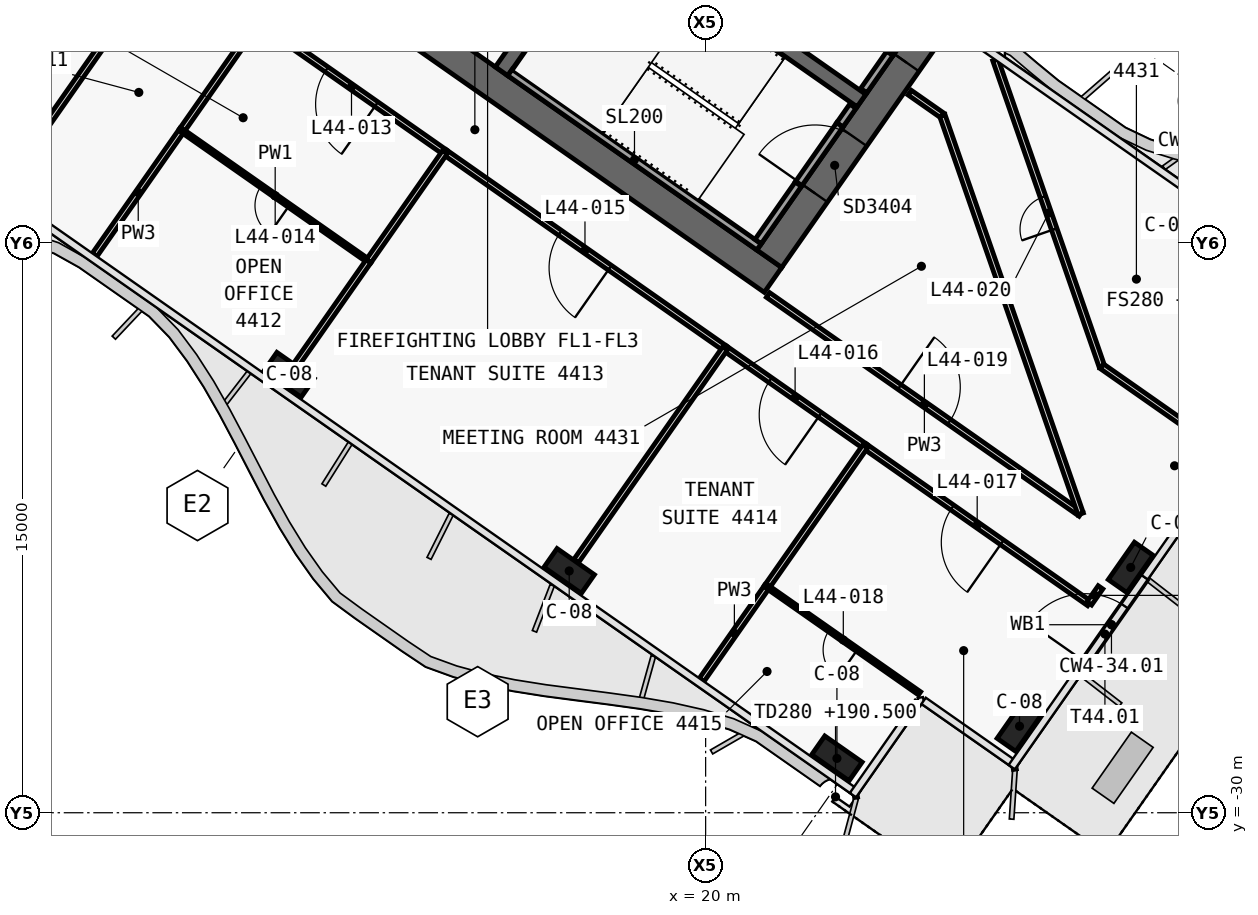
"""IFC4 building model, lengths in metres.
Left out: names, types, materials, properties, quantities, classifications, styles, units other than length and angle.
Written with IfcOpenShell. Run it as: python <this file> out.ifc"""

import sys

from ifc_helpers import new_model, si_unit, direction, frame, frame_2d, origin, origin_2d, place, context, subcontext, project, spatial, polyline, rectangle, outline, extrude, element, fill, save


model = new_model("IFC4")
c1 = context("Model", 3, precision=1e-05, world=origin(), true_north=direction((0.0, 1.0)))
c2 = subcontext(c1, "Body", "Model", "MODEL_VIEW")
j1 = project(units=[si_unit("LENGTHUNIT", "METRE"), si_unit("PLANEANGLEUNIT", "RADIAN")], contexts=[c1])
p1 = place(None, origin())
s1 = spatial("IfcSite", under=j1, at=p1, CompositionType="ELEMENT")
p2 = place(p1, origin())
s2 = spatial("IfcBuilding", under=s1, at=p2, CompositionType="ELEMENT")
p3 = place(p2, frame((0.0, 0.0, 190.5)))
s3 = spatial("IfcBuildingStorey", under=s2, at=p3, CompositionType="ELEMENT", Elevation=190.5)
p4 = place(p3, frame((-0.029, -0.712, 0.0), z_axis=(0.0, 0.0, 1.0), x_axis=(0.819151758019, -0.573576845187, 0.0)))
e1 = element("IfcWall", 1, at=p4, inside=s3, PredefinedType="SHEAR", context=c2, shape_type="SweptSolid", body=[
    extrude(outline(polyline([(26.616, 0.4), (-0.0, 0.4), (0.56, -0.4), (26.616, -0.4), (26.616, 0.4)])), origin(), (0.0, 0.0, 1.0), 3.9),
])
p5 = place(p4, frame((0.966, 0.0, 0.0)))
e2 = element("IfcOpeningElement", 2, at=p5, cuts=e1, PredefinedType="OPENING", context=c2, shape_type="SweptSolid", body=[
    extrude(rectangle(XDim=1.5, YDim=2.1, at=frame_2d((0.75, 1.05))), frame((0.0, 0.41, 0.0), z_axis=(0.0, -1.0, 0.0), x_axis=(1.0, 0.0, 0.0)), (0.0, 0.0, 1.0), 0.82),
])
p6 = place(p4, frame((12.366, 0.0, 0.0)))
e3 = element("IfcOpeningElement", 3, at=p6, cuts=e1, PredefinedType="OPENING", context=c2, shape_type="SweptSolid", body=[
    extrude(rectangle(XDim=1.5, YDim=2.1, at=frame_2d((0.75, 1.05))), frame((0.0, 0.41, 0.0), z_axis=(0.0, -1.0, 0.0), x_axis=(1.0, 0.0, 0.0)), (0.0, 0.0, 1.0), 0.82),
])
p7 = place(p3, frame((21.675, -15.421, 0.0), z_axis=(0.0, 0.0, 1.0), x_axis=(0.573581815061, 0.819148278049, 0.0)))
e4 = element("IfcWall", 4, at=p7, inside=s3, PredefinedType="SHEAR", context=c2, shape_type="SweptSolid", body=[
    extrude(outline(polyline([(9.6, 0.4), (0.0, 0.4), (0.0, -0.4), (9.6, -0.4), (9.6, 0.4)])), origin(), (0.0, 0.0, 1.0), 3.9),
])
p8 = place(p7, frame((6.3, 0.0, 0.0)))
e5 = element("IfcOpeningElement", 5, at=p8, cuts=e4, PredefinedType="OPENING", context=c2, shape_type="SweptSolid", body=[
    extrude(rectangle(XDim=1.8, YDim=2.1, at=frame_2d((0.9, 1.05))), frame((0.0, 0.41, 0.0), z_axis=(0.0, -1.0, 0.0), x_axis=(1.0, 0.0, 0.0)), (0.0, 0.0, 1.0), 0.82),
])
p9 = place(p7, frame((2.1, 0.0, 0.0)))
e6 = element("IfcOpeningElement", 6, at=p9, cuts=e4, PredefinedType="OPENING", context=c2, shape_type="SweptSolid", body=[
    extrude(rectangle(XDim=1.8, YDim=2.1, at=frame_2d((0.9, 1.05))), frame((0.0, 0.41, 0.0), z_axis=(0.0, -1.0, 0.0), x_axis=(1.0, 0.0, 0.0)), (0.0, 0.0, 1.0), 0.82),
])
p10 = place(p3, frame((14.63, -10.488, 0.0), z_axis=(0.0, 0.0, 1.0), x_axis=(0.573611936273, 0.819127185829, 0.0)))
e7 = element("IfcWall", 7, at=p10, inside=s3, PredefinedType="SHEAR", context=c2, shape_type="SweptSolid", body=[
    extrude(outline(polyline([(0.0, 0.2), (0.0, -0.2), (4.6, -0.2), (4.6, 0.2), (0.0, 0.2)])), origin(), (0.0, 0.0, 1.0), 3.9),
])
p11 = place(p3, frame((2.638, 3.768, 0.0), z_axis=(0.0, 0.0, 1.0), x_axis=(0.81915267502, -0.573575535572, 0.0)))
e8 = element("IfcWall", 8, at=p11, inside=s3, PredefinedType="SHEAR", context=c2, shape_type="SweptSolid", body=[
    extrude(outline(polyline([(0.0, 0.2), (0.0, -0.2), (26.2, -0.2), (26.2, 0.2), (0.0, 0.2)])), origin(), (0.0, 0.0, 1.0), 3.9),
])
p12 = place(p11, frame((9.637, 0.0, 0.0)))
e9 = element("IfcOpeningElement", 9, at=p12, cuts=e8, PredefinedType="OPENING", context=c2, shape_type="SweptSolid", body=[
    extrude(rectangle(XDim=1.2, YDim=2.1, at=frame_2d((0.6, 1.05))), frame((0.0, 0.21, 0.0), z_axis=(0.0, -1.0, 0.0), x_axis=(1.0, 0.0, 0.0)), (0.0, 0.0, 1.0), 0.42),
])
p13 = place(p11, frame((11.812, 0.0, 0.0)))
e10 = element("IfcOpeningElement", 10, at=p13, cuts=e8, PredefinedType="OPENING", context=c2, shape_type="SweptSolid", body=[
    extrude(rectangle(XDim=1.2, YDim=2.1, at=frame_2d((0.6, 1.05))), frame((0.0, 0.21, 0.0), z_axis=(0.0, -1.0, 0.0), x_axis=(1.0, 0.0, 0.0)), (0.0, 0.0, 1.0), 0.42),
])
p14 = place(p11, frame((13.988, 0.0, 0.0)))
e11 = element("IfcOpeningElement", 11, at=p14, cuts=e8, PredefinedType="OPENING", context=c2, shape_type="SweptSolid", body=[
    extrude(rectangle(XDim=1.2, YDim=2.1, at=frame_2d((0.6, 1.05))), frame((0.0, 0.21, 0.0), z_axis=(0.0, -1.0, 0.0), x_axis=(1.0, 0.0, 0.0)), (0.0, 0.0, 1.0), 0.42),
])
p15 = place(p11, frame((16.262, 0.0, 0.0)))
e12 = element("IfcOpeningElement", 12, at=p15, cuts=e8, PredefinedType="OPENING", context=c2, shape_type="SweptSolid", body=[
    extrude(rectangle(XDim=1.0, YDim=2.1, at=frame_2d((0.5, 1.05))), frame((0.0, 0.21, 0.0), z_axis=(0.0, -1.0, 0.0), x_axis=(1.0, 0.0, 0.0)), (0.0, 0.0, 1.0), 0.42),
])
for number, where, z_axis, x_axis in (
    (13, (9.038, -18.475, 0.0), (0.0, 0.0, 1.0), (0.819, -0.574, 0.0)),
    (14, (16.41, -23.637, 0.0), (0.0, 0.0, 1.0), (0.819, -0.574, 0.0)),
    (15, (23.455, -28.57, 0.0), (0.0, 0.0, 1.0), (0.819, -0.574, 0.0)),
    (16, (28.26, -27.723, 0.0), (0.0, 0.0, 1.0), (0.574, 0.819, 0.0)),
    (17, (31.185, -23.545, 0.0), (0.0, 0.0, 1.0), (0.574, 0.819, 0.0)),
):
    element("IfcColumn", number, at=place(p3, frame(where, z_axis=z_axis, x_axis=x_axis)), inside=s3, PredefinedType="COLUMN", context=c2, shape_type="SweptSolid", body=[
        extrude(rectangle(XDim=1.2, YDim=0.6, at=origin_2d()), origin(), (0.0, 0.0, 1.0), 3.9),
    ])
p16 = place(p3, frame((24.162, -10.998, 0.0), z_axis=(0.0, 0.0, 1.0), x_axis=(0.573612502218, 0.819126789514, 0.0)))
e18 = element("IfcWall", 18, at=p16, inside=s3, PredefinedType="SOLIDWALL", context=c2, shape_type="SweptSolid", body=[
    extrude(rectangle(XDim=1.2, YDim=0.2, at=frame_2d((0.6, 0.0))), origin(), (0.0, 0.0, 1.0), 3.62),
])
p17 = place(p3, frame((24.85, -10.014, 2.15), z_axis=(0.0, 0.0, 1.0), x_axis=(0.573505465124, 0.819201734296, 0.0)))
e19 = element("IfcWall", 19, at=p17, inside=s3, PredefinedType="SOLIDWALL", context=c2, shape_type="SweptSolid", body=[
    extrude(rectangle(XDim=1.9, YDim=0.2, at=frame_2d((0.95, 0.0))), origin(), (0.0, 0.0, 1.0), 1.47),
])
p18 = place(p3, frame((14.851, -10.521, 0.0), z_axis=(0.0, 0.0, 1.0), x_axis=(0.819141584393, -0.57359137434, 0.0)))
e20 = element("IfcWall", 20, at=p18, inside=s3, PredefinedType="SOLIDWALL", context=c2, shape_type="SweptSolid", body=[
    extrude(rectangle(XDim=8.0, YDim=0.2, at=frame_2d((4.0, 0.0))), origin(), (0.0, 0.0, 1.0), 3.62),
])
p19 = place(p3, frame((21.38, -14.97, 0.0), z_axis=(0.0, 0.0, 1.0), x_axis=(0.573559770908, 0.819163713305, 0.0)))
e21 = element("IfcWall", 21, at=p19, inside=s3, PredefinedType="SOLIDWALL", context=c2, shape_type="SweptSolid", body=[
    extrude(rectangle(XDim=1.85, YDim=0.2, at=frame_2d((0.925, 0.0))), origin(), (0.0, 0.0, 1.0), 3.62),
])
p20 = place(p3, frame((23.531, -11.898, 0.0), z_axis=(0.0, 0.0, 1.0), x_axis=(0.573708088123, 0.819059844958, 0.0)))
e22 = element("IfcWall", 22, at=p20, inside=s3, PredefinedType="SOLIDWALL", context=c2, shape_type="SweptSolid", body=[
    extrude(rectangle(XDim=0.6, YDim=0.2, at=frame_2d((0.3, 0.0))), origin(), (0.0, 0.0, 1.0), 3.62),
])
p21 = place(p3, frame((22.441, -13.455, 2.15), z_axis=(0.0, 0.0, 1.0), x_axis=(0.573591692345, 0.819141361715, 0.0)))
e23 = element("IfcWall", 23, at=p21, inside=s3, PredefinedType="SOLIDWALL", context=c2, shape_type="SweptSolid", body=[
    extrude(rectangle(XDim=1.9, YDim=0.2, at=frame_2d((0.95, 0.0))), origin(), (0.0, 0.0, 1.0), 1.47),
])
p22 = place(p3, frame((29.821, -26.277, 0.0), z_axis=(0.0, 0.0, 1.0), x_axis=(0.57360481557, 0.819132172213, 0.0)))
e24 = element("IfcWall", 24, at=p22, inside=s3, PredefinedType="SOLIDWALL", context=c2, shape_type="SweptSolid", body=[
    extrude(rectangle(XDim=2.99, YDim=0.2, at=frame_2d((1.495, 0.0))), origin(), (0.0, 0.0, 1.0), 3.62),
])
p23 = place(p22, frame((0.295, 0.0, 0.0)))
e25 = element("IfcOpeningElement", 25, at=p23, cuts=e24, PredefinedType="OPENING", context=c2, shape_type="SweptSolid", body=[
    extrude(rectangle(XDim=1.8, YDim=2.4, at=frame_2d((0.9, 1.2))), frame((0.0, 0.11, 0.0), z_axis=(0.0, -1.0, 0.0), x_axis=(1.0, 0.0, 0.0)), (0.0, 0.0, 1.0), 0.22),
])
p24 = place(p3, frame((21.642, -16.375, 0.0), z_axis=(0.0, 0.0, 1.0), x_axis=(0.819157697527, -0.573568362606, 0.0)))
e26 = element("IfcWall", 26, at=p24, inside=s3, PredefinedType="PARTITIONING", context=c2, shape_type="SweptSolid", body=[
    extrude(rectangle(XDim=10.045, YDim=0.15, at=frame_2d((5.023, 0.0))), origin(), (0.0, 0.0, 1.0), 3.0),
])
p25 = place(p24, frame((4.223, 0.0, 0.0)))
e27 = element("IfcOpeningElement", 27, at=p25, cuts=e26, PredefinedType="OPENING", context=c2, shape_type="SweptSolid", body=[
    extrude(rectangle(XDim=1.6, YDim=2.1, at=frame_2d((0.8, 1.05))), frame((0.0, 0.085, 0.0), z_axis=(0.0, -1.0, 0.0), x_axis=(1.0, 0.0, 0.0)), (0.0, 0.0, 1.0), 0.17),
])
p26 = place(p3, frame((13.14, -12.619, 0.0), z_axis=(0.0, 0.0, 1.0), x_axis=(-0.819145946981, 0.573585144111, 0.0)))
e28 = element("IfcWall", 28, at=p26, inside=s3, PredefinedType="PARTITIONING", context=c2, shape_type="SweptSolid", body=[
    extrude(rectangle(XDim=6.004, YDim=0.15, at=frame_2d((3.002, 0.0))), origin(), (0.0, 0.0, 1.0), 3.0),
])
p27 = place(p26, frame((2.202, 0.0, 0.0)))
e29 = element("IfcOpeningElement", 29, at=p27, cuts=e28, PredefinedType="OPENING", context=c2, shape_type="SweptSolid", body=[
    extrude(rectangle(XDim=1.6, YDim=2.1, at=frame_2d((0.8, 1.05))), frame((0.0, 0.085, 0.0), z_axis=(0.0, -1.0, 0.0), x_axis=(1.0, 0.0, 0.0)), (0.0, 0.0, 1.0), 0.17),
])
p28 = place(p3, frame((20.513, -17.781, 0.0), z_axis=(0.0, 0.0, 1.0), x_axis=(-0.819155480642, 0.5735715287, 0.0)))
e30 = element("IfcWall", 30, at=p28, inside=s3, PredefinedType="PARTITIONING", context=c2, shape_type="SweptSolid", body=[
    extrude(rectangle(XDim=9.004, YDim=0.15, at=frame_2d((4.502, 0.0))), origin(), (0.0, 0.0, 1.0), 3.0),
])
p29 = place(p28, frame((3.702, 0.0, 0.0)))
e31 = element("IfcOpeningElement", 31, at=p29, cuts=e30, PredefinedType="OPENING", context=c2, shape_type="SweptSolid", body=[
    extrude(rectangle(XDim=1.6, YDim=2.1, at=frame_2d((0.8, 1.05))), frame((0.0, 0.085, 0.0), z_axis=(0.0, -1.0, 0.0), x_axis=(1.0, 0.0, 0.0)), (0.0, 0.0, 1.0), 0.17),
])
p30 = place(p3, frame((24.199, -20.362, 0.0), z_axis=(0.0, 0.0, 1.0), x_axis=(-0.819165703328, 0.573556928727, 0.0)))
e32 = element("IfcWall", 32, at=p30, inside=s3, PredefinedType="PARTITIONING", context=c2, shape_type="SweptSolid", body=[
    extrude(rectangle(XDim=4.504, YDim=0.15, at=frame_2d((2.252, 0.0))), origin(), (0.0, 0.0, 1.0), 3.0),
])
p31 = place(p30, frame((1.452, 0.0, 0.0)))
e33 = element("IfcOpeningElement", 33, at=p31, cuts=e32, PredefinedType="OPENING", context=c2, shape_type="SweptSolid", body=[
    extrude(rectangle(XDim=1.6, YDim=2.1, at=frame_2d((0.8, 1.05))), frame((0.0, 0.085, 0.0), z_axis=(0.0, -1.0, 0.0), x_axis=(1.0, 0.0, 0.0)), (0.0, 0.0, 1.0), 0.17),
])
p32 = place(p3, frame((30.095, -24.491, 0.0), z_axis=(0.0, 0.0, 1.0), x_axis=(-0.819144322262, 0.57358746439, 0.0)))
e34 = element("IfcWall", 34, at=p32, inside=s3, PredefinedType="PARTITIONING", context=c2, shape_type="SweptSolid", body=[
    extrude(rectangle(XDim=7.202, YDim=0.15, at=frame_2d((3.601, 0.0))), origin(), (0.0, 0.0, 1.0), 3.0),
])
p33 = place(p32, frame((2.801, 0.0, 0.0)))
e35 = element("IfcOpeningElement", 35, at=p33, cuts=e34, PredefinedType="OPENING", context=c2, shape_type="SweptSolid", body=[
    extrude(rectangle(XDim=1.6, YDim=2.1, at=frame_2d((0.8, 1.05))), frame((0.0, 0.085, 0.0), z_axis=(0.0, -1.0, 0.0), x_axis=(1.0, 0.0, 0.0)), (0.0, 0.0, 1.0), 0.17),
])
p34 = place(p3, frame((30.391, -24.069, 0.0), z_axis=(0.0, 0.0, 1.0), x_axis=(-0.573462344363, -0.819231920519, 0.0)))
e36 = element("IfcWall", 36, at=p34, inside=s3, PredefinedType="PARTITIONING", context=c2, shape_type="SweptSolid", body=[
    extrude(rectangle(XDim=0.516, YDim=0.15, at=frame_2d((0.258, 0.0))), origin(), (0.0, 0.0, 1.0), 3.62),
])
p35 = place(p3, frame((30.425, -18.251, 0.0), z_axis=(0.0, 0.0, 1.0), x_axis=(-0.328044658963, 0.944662215676, 0.0)))
e37 = element("IfcWall", 37, at=p35, inside=s3, PredefinedType="PARTITIONING", context=c2, shape_type="SweptSolid", body=[
    extrude(rectangle(XDim=8.536, YDim=0.15, at=frame_2d((4.268, 0.0))), origin(), (0.0, 0.0, 1.0), 3.0),
])
p36 = place(p35, frame((3.818, 0.0, 0.0)))
e38 = element("IfcOpeningElement", 38, at=p36, cuts=e37, PredefinedType="OPENING", context=c2, shape_type="SweptSolid", body=[
    extrude(rectangle(XDim=0.9, YDim=2.1, at=frame_2d((0.45, 1.05))), frame((0.0, 0.085, 0.0), z_axis=(0.0, -1.0, 0.0), x_axis=(1.0, 0.0, 0.0)), (0.0, 0.0, 1.0), 0.17),
])
p37 = place(p3, frame((33.709, -20.55, 0.0), z_axis=(0.0, 0.0, 1.0), x_axis=(-0.819146074823, 0.573584961538, 0.0)))
e39 = element("IfcWall", 39, at=p37, inside=s3, PredefinedType="PARTITIONING", context=c2, shape_type="SweptSolid", body=[
    extrude(rectangle(XDim=4.009, YDim=0.15, at=frame_2d((2.004, 0.0))), origin(), (0.0, 0.0, 1.0), 2.9),
])
p38 = place(p3, frame((25.37, -11.051, 0.0), z_axis=(0.0, 0.0, 1.0), x_axis=(0.819396161963, -0.573227642181, 0.0)))
e40 = element("IfcWall", 40, at=p38, inside=s3, PredefinedType="PARTITIONING", context=c2, shape_type="SweptSolid", body=[
    extrude(rectangle(XDim=1.047, YDim=0.15, at=frame_2d((0.524, 0.0))), origin(), (0.0, 0.0, 1.0), 3.62),
])
p39 = place(p3, frame((26.228, -11.651, 0.0), z_axis=(0.0, 0.0, 1.0), x_axis=(0.328068399041, -0.944653971331, 0.0)))
e41 = element("IfcWall", 41, at=p39, inside=s3, PredefinedType="PARTITIONING", context=c2, shape_type="SweptSolid", body=[
    extrude(rectangle(XDim=11.099, YDim=0.15, at=frame_2d((5.549, 0.0))), origin(), (0.0, 0.0, 1.0), 3.0),
])
p40 = place(p3, frame((6.217, -12.043, 0.0), z_axis=(0.0, 0.0, 1.0), x_axis=(-0.573523771938, -0.819188917785, 0.0)))
e42 = element("IfcWall", 42, at=p40, inside=s3, PredefinedType="PARTITIONING", context=c2, shape_type="SweptSolid", body=[
    extrude(rectangle(XDim=4.001, YDim=0.15, at=frame_2d((2.0, 0.0))), origin(), (0.0, 0.0, 1.0), 2.9),
])
p41 = place(p3, frame((8.224, -9.177, 0.0), z_axis=(0.0, 0.0, 1.0), x_axis=(-0.573602698703, -0.819133654565, 0.0)))
e43 = element("IfcWall", 43, at=p41, inside=s3, PredefinedType="PARTITIONING", context=c2, shape_type="SweptSolid", body=[
    extrude(rectangle(XDim=3.502, YDim=0.15, at=frame_2d((1.751, 0.0))), origin(), (0.0, 0.0, 1.0), 3.62),
])
p42 = place(p3, frame((1.849, -13.051, 0.0), z_axis=(0.0, 0.0, 1.0), x_axis=(0.573577493031, 0.819151304393, 0.0)))
e44 = element("IfcWall", 44, at=p42, inside=s3, PredefinedType="PARTITIONING", context=c2, shape_type="SweptSolid", body=[
    extrude(rectangle(XDim=6.83, YDim=0.15, at=frame_2d((3.415, 0.0))), origin(), (0.0, 0.0, 1.0), 3.0),
])
p43 = place(p3, frame((11.131, -15.486, 0.0), z_axis=(0.0, 0.0, 1.0), x_axis=(-0.819149710902, 0.573579768758, 0.0)))
e45 = element("IfcWall", 45, at=p43, inside=s3, PredefinedType="PARTITIONING", context=c2, shape_type="SweptSolid", body=[
    extrude(rectangle(XDim=6.0, YDim=0.1, at=frame_2d((3.0, 0.0))), origin(), (0.0, 0.0, 1.0), 3.0),
])
p44 = place(p43, frame((2.55, 0.0, 0.0)))
e46 = element("IfcOpeningElement", 46, at=p44, cuts=e45, PredefinedType="OPENING", context=c2, shape_type="SweptSolid", body=[
    extrude(rectangle(XDim=0.9, YDim=2.1, at=frame_2d((0.45, 1.05))), frame((0.0, 0.06, 0.0), z_axis=(0.0, -1.0, 0.0), x_axis=(1.0, 0.0, 0.0)), (0.0, 0.0, 1.0), 0.12),
])
p45 = place(p3, frame((11.131, -15.486, 0.0), z_axis=(0.0, 0.0, 1.0), x_axis=(-0.573560777794, -0.819163008306, 0.0)))
e47 = element("IfcWall", 47, at=p45, inside=s3, PredefinedType="PARTITIONING", context=c2, shape_type="SweptSolid", body=[
    extrude(rectangle(XDim=3.329, YDim=0.15, at=frame_2d((1.665, 0.0))), origin(), (0.0, 0.0, 1.0), 3.0),
])
p46 = place(p3, frame((13.139, -12.618, 0.0), z_axis=(0.0, 0.0, 1.0), x_axis=(-0.573565328398, -0.819159822049, 0.0)))
e48 = element("IfcWall", 48, at=p46, inside=s3, PredefinedType="PARTITIONING", context=c2, shape_type="SweptSolid", body=[
    extrude(rectangle(XDim=3.5, YDim=0.15, at=frame_2d((1.75, 0.0))), origin(), (0.0, 0.0, 1.0), 3.0),
])
p47 = place(p3, frame((20.511, -17.78, 0.0), z_axis=(0.0, 0.0, 1.0), x_axis=(-0.573577493031, -0.819151304393, 0.0)))
e49 = element("IfcWall", 49, at=p47, inside=s3, PredefinedType="PARTITIONING", context=c2, shape_type="SweptSolid", body=[
    extrude(rectangle(XDim=6.83, YDim=0.15, at=frame_2d((3.415, 0.0))), origin(), (0.0, 0.0, 1.0), 3.0),
])
p48 = place(p3, frame((21.617, -24.047, 0.0), z_axis=(0.0, 0.0, 1.0), x_axis=(-0.573555162214, -0.819166940189, 0.0)))
e50 = element("IfcWall", 50, at=p48, inside=s3, PredefinedType="PARTITIONING", context=c2, shape_type="SweptSolid", body=[
    extrude(rectangle(XDim=3.001, YDim=0.15, at=frame_2d((1.5, 0.0))), origin(), (0.0, 0.0, 1.0), 2.9),
])
p49 = place(p3, frame((24.197, -20.361, 0.0), z_axis=(0.0, 0.0, 1.0), x_axis=(-0.573589723117, -0.819142740634, 0.0)))
e51 = element("IfcWall", 51, at=p49, inside=s3, PredefinedType="PARTITIONING", context=c2, shape_type="SweptSolid", body=[
    extrude(rectangle(XDim=4.502, YDim=0.15, at=frame_2d((2.251, 0.0))), origin(), (0.0, 0.0, 1.0), 3.62),
])
p50 = place(p3, frame((25.629, -26.859, 0.0), z_axis=(0.0, 0.0, 1.0), x_axis=(-0.819154669329, 0.573572687386, 0.0)))
e52 = element("IfcWall", 52, at=p50, inside=s3, PredefinedType="PARTITIONING", context=c2, shape_type="SweptSolid", body=[
    extrude(rectangle(XDim=4.9, YDim=0.1, at=frame_2d((2.45, 0.0))), origin(), (0.0, 0.0, 1.0), 3.0),
])
p51 = place(p50, frame((2.0, 0.0, 0.0)))
e53 = element("IfcOpeningElement", 53, at=p51, cuts=e52, PredefinedType="OPENING", context=c2, shape_type="SweptSolid", body=[
    extrude(rectangle(XDim=0.9, YDim=2.1, at=frame_2d((0.45, 1.05))), frame((0.0, 0.06, 0.0), z_axis=(0.0, -1.0, 0.0), x_axis=(1.0, 0.0, 0.0)), (0.0, 0.0, 1.0), 0.12),
])
p52 = place(p8, origin())
e54 = element("IfcDoor", 54, at=p52, inside=s3, OperationType="DOUBLE_DOOR_SINGLE_SWING", PredefinedType="DOOR", context=c2, shape_type="SweptSolid", body=[
    extrude(rectangle(XDim=1.8, YDim=2.1, at=frame_2d((0.9, 1.05))), frame((0.0, 0.025, 0.0), z_axis=(0.0, -1.0, 0.0), x_axis=(1.0, 0.0, 0.0)), (0.0, 0.0, 1.0), 0.05),
])
fill(e5, e54)
p53 = place(p9, origin())
e55 = element("IfcDoor", 55, at=p53, inside=s3, OperationType="DOUBLE_DOOR_SINGLE_SWING", PredefinedType="DOOR", context=c2, shape_type="SweptSolid", body=[
    extrude(rectangle(XDim=1.8, YDim=2.1, at=frame_2d((0.9, 1.05))), frame((0.0, 0.025, 0.0), z_axis=(0.0, -1.0, 0.0), x_axis=(1.0, 0.0, 0.0)), (0.0, 0.0, 1.0), 0.05),
])
fill(e6, e55)
p54 = place(p23, origin())
e56 = element("IfcDoor", 56, at=p54, inside=s3, OperationType="DOUBLE_DOOR_DOUBLE_SWING", PredefinedType="DOOR", context=c2, shape_type="SweptSolid", body=[
    extrude(rectangle(XDim=1.8, YDim=2.4, at=frame_2d((0.9, 1.2))), frame((0.0, 0.025, 0.0), z_axis=(0.0, -1.0, 0.0), x_axis=(1.0, 0.0, 0.0)), (0.0, 0.0, 1.0), 0.05),
])
fill(e25, e56)
p55 = place(p27, origin())
e57 = element("IfcDoor", 57, at=p55, inside=s3, OperationType="DOUBLE_DOOR_SINGLE_SWING", PredefinedType="DOOR", context=c2, shape_type="SweptSolid", body=[
    extrude(rectangle(XDim=1.6, YDim=2.1, at=frame_2d((0.8, 1.05))), frame((0.0, 0.025, 0.0), z_axis=(0.0, -1.0, 0.0), x_axis=(1.0, 0.0, 0.0)), (0.0, 0.0, 1.0), 0.05),
])
fill(e29, e57)
p56 = place(p44, origin())
e58 = element("IfcDoor", 58, at=p56, inside=s3, OperationType="SINGLE_SWING_RIGHT", PredefinedType="DOOR", context=c2, shape_type="SweptSolid", body=[
    extrude(rectangle(XDim=0.9, YDim=2.1, at=frame_2d((0.45, 1.05))), frame((0.0, 0.025, 0.0), z_axis=(0.0, -1.0, 0.0), x_axis=(1.0, 0.0, 0.0)), (0.0, 0.0, 1.0), 0.05),
])
fill(e46, e58)
p57 = place(p29, origin())
e59 = element("IfcDoor", 59, at=p57, inside=s3, OperationType="DOUBLE_DOOR_SINGLE_SWING", PredefinedType="DOOR", context=c2, shape_type="SweptSolid", body=[
    extrude(rectangle(XDim=1.6, YDim=2.1, at=frame_2d((0.8, 1.05))), frame((0.0, 0.025, 0.0), z_axis=(0.0, -1.0, 0.0), x_axis=(1.0, 0.0, 0.0)), (0.0, 0.0, 1.0), 0.05),
])
fill(e31, e59)
p58 = place(p31, origin())
e60 = element("IfcDoor", 60, at=p58, inside=s3, OperationType="DOUBLE_DOOR_SINGLE_SWING", PredefinedType="DOOR", context=c2, shape_type="SweptSolid", body=[
    extrude(rectangle(XDim=1.6, YDim=2.1, at=frame_2d((0.8, 1.05))), frame((0.0, 0.025, 0.0), z_axis=(0.0, -1.0, 0.0), x_axis=(1.0, 0.0, 0.0)), (0.0, 0.0, 1.0), 0.05),
])
fill(e33, e60)
p59 = place(p33, origin())
e61 = element("IfcDoor", 61, at=p59, inside=s3, OperationType="DOUBLE_DOOR_SINGLE_SWING", PredefinedType="DOOR", context=c2, shape_type="SweptSolid", body=[
    extrude(rectangle(XDim=1.6, YDim=2.1, at=frame_2d((0.8, 1.05))), frame((0.0, 0.025, 0.0), z_axis=(0.0, -1.0, 0.0), x_axis=(1.0, 0.0, 0.0)), (0.0, 0.0, 1.0), 0.05),
])
fill(e35, e61)
p60 = place(p51, origin())
e62 = element("IfcDoor", 62, at=p60, inside=s3, OperationType="SINGLE_SWING_LEFT", PredefinedType="DOOR", context=c2, shape_type="SweptSolid", body=[
    extrude(rectangle(XDim=0.9, YDim=2.1, at=frame_2d((0.45, 1.05))), frame((0.0, 0.025, 0.0), z_axis=(0.0, -1.0, 0.0), x_axis=(1.0, 0.0, 0.0)), (0.0, 0.0, 1.0), 0.05),
])
fill(e53, e62)
p61 = place(p25, origin())
e63 = element("IfcDoor", 63, at=p61, inside=s3, OperationType="DOUBLE_DOOR_SINGLE_SWING", PredefinedType="DOOR", context=c2, shape_type="SweptSolid", body=[
    extrude(rectangle(XDim=1.6, YDim=2.1, at=frame_2d((0.8, 1.05))), frame((0.0, 0.025, 0.0), z_axis=(0.0, -1.0, 0.0), x_axis=(1.0, 0.0, 0.0)), (0.0, 0.0, 1.0), 0.05),
])
fill(e27, e63)
p62 = place(p36, origin())
e64 = element("IfcDoor", 64, at=p62, inside=s3, OperationType="SINGLE_SWING_LEFT", PredefinedType="DOOR", context=c2, shape_type="SweptSolid", body=[
    extrude(rectangle(XDim=0.9, YDim=2.1, at=frame_2d((0.45, 1.05))), frame((0.0, 0.025, 0.0), z_axis=(0.0, -1.0, 0.0), x_axis=(1.0, 0.0, 0.0)), (0.0, 0.0, 1.0), 0.05),
])
fill(e38, e64)
save(model, sys.argv[1])
